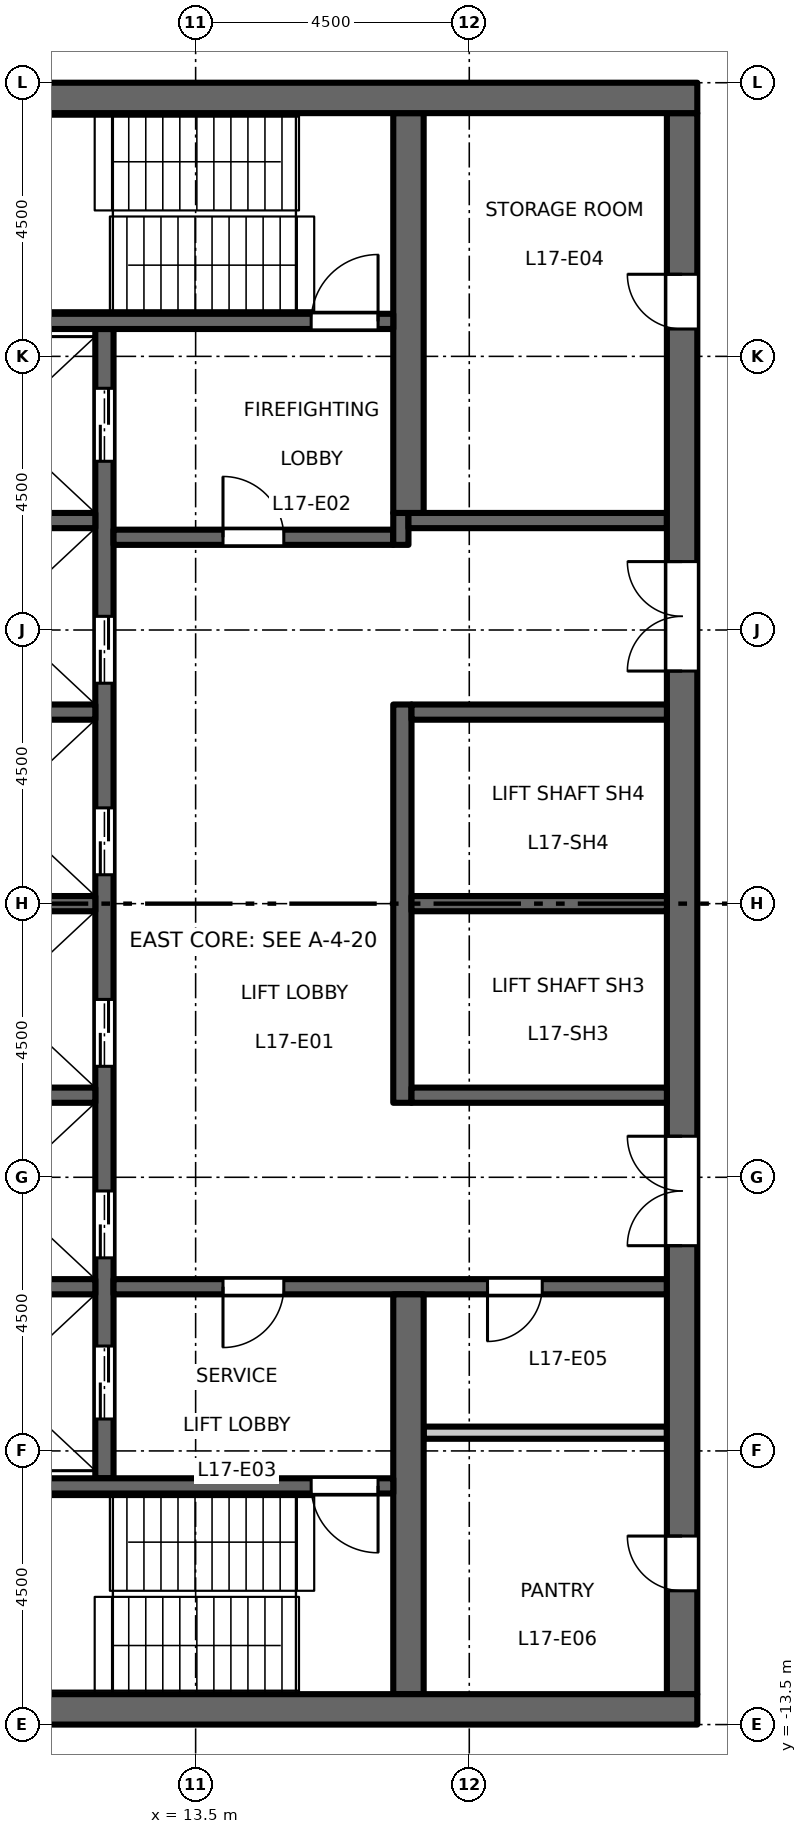
"""IFC4 building model, lengths in metres.
Left out: names, types, materials, properties, quantities, classifications, styles, units other than length and angle.
Written with IfcOpenShell. Run it as: python <this file> out.ifc"""

import sys

from ifc_helpers import new_model, si_unit, direction, frame, frame_2d, origin, place, context, subcontext, project, spatial, rectangle, extrude, element, fill, save


model = new_model("IFC4")
c1 = context("Model", 3, precision=1e-05, world=origin(), true_north=direction((0.0, 1.0)))
c2 = subcontext(c1, "Body", "Model", "MODEL_VIEW")
j1 = project(units=[si_unit("LENGTHUNIT", "METRE"), si_unit("PLANEANGLEUNIT", "RADIAN")], contexts=[c1])
p1 = place(None, origin())
s1 = spatial("IfcSite", under=j1, at=p1, CompositionType="ELEMENT")
p2 = place(p1, origin())
s2 = spatial("IfcBuilding", under=s1, at=p2, CompositionType="ELEMENT")
p3 = place(p2, frame((0.0, 0.0, 80.7)))
s3 = spatial("IfcBuildingStorey", under=s2, at=p3, CompositionType="ELEMENT", Elevation=80.7)
p4 = place(p3, frame((12.0, -9.45, 0.0), z_axis=(0.0, 0.0, 1.0), x_axis=(0.0, 1.0, 0.0)))
e1 = element("IfcWall", 1, at=p4, inside=s3, PredefinedType="SHEAR", context=c2, shape_type="SweptSolid", body=[
    extrude(rectangle(XDim=18.9, YDim=0.3, at=frame_2d((9.45, 0.0))), origin(), (0.0, 0.0, 1.0), 4.35),
])
p5 = place(p4, frame((3.625, 0.0, 0.0)))
e2 = element("IfcOpeningElement", 2, at=p5, cuts=e1, PredefinedType="OPENING", context=c2, shape_type="SweptSolid", body=[
    extrude(rectangle(XDim=1.1, YDim=2.1, at=frame_2d((0.55, 1.05))), frame((0.0, 0.16, 0.0), z_axis=(0.0, -1.0, 0.0), x_axis=(1.0, 0.0, 0.0)), (0.0, 0.0, 1.0), 0.32),
])
p6 = place(p4, frame((6.775, 0.0, 0.0)))
e3 = element("IfcOpeningElement", 3, at=p6, cuts=e1, PredefinedType="OPENING", context=c2, shape_type="SweptSolid", body=[
    extrude(rectangle(XDim=1.1, YDim=2.1, at=frame_2d((0.55, 1.05))), frame((0.0, 0.16, 0.0), z_axis=(0.0, -1.0, 0.0), x_axis=(1.0, 0.0, 0.0)), (0.0, 0.0, 1.0), 0.32),
])
p7 = place(p4, frame((9.925, 0.0, 0.0)))
e4 = element("IfcOpeningElement", 4, at=p7, cuts=e1, PredefinedType="OPENING", context=c2, shape_type="SweptSolid", body=[
    extrude(rectangle(XDim=1.1, YDim=2.1, at=frame_2d((0.55, 1.05))), frame((0.0, 0.16, 0.0), z_axis=(0.0, -1.0, 0.0), x_axis=(1.0, 0.0, 0.0)), (0.0, 0.0, 1.0), 0.32),
])
p8 = place(p4, frame((13.075, 0.0, 0.0)))
e5 = element("IfcOpeningElement", 5, at=p8, cuts=e1, PredefinedType="OPENING", context=c2, shape_type="SweptSolid", body=[
    extrude(rectangle(XDim=1.1, YDim=2.1, at=frame_2d((0.55, 1.05))), frame((0.0, 0.16, 0.0), z_axis=(0.0, -1.0, 0.0), x_axis=(1.0, 0.0, 0.0)), (0.0, 0.0, 1.0), 0.32),
])
p9 = place(p4, frame((16.725, 0.0, 0.0)))
e6 = element("IfcOpeningElement", 6, at=p9, cuts=e1, PredefinedType="OPENING", context=c2, shape_type="SweptSolid", body=[
    extrude(rectangle(XDim=1.2, YDim=2.1, at=frame_2d((0.6, 1.05))), frame((0.0, 0.16, 0.0), z_axis=(0.0, -1.0, 0.0), x_axis=(1.0, 0.0, 0.0)), (0.0, 0.0, 1.0), 0.32),
])
p10 = place(p4, frame((0.975, 0.0, 0.0)))
e7 = element("IfcOpeningElement", 7, at=p10, cuts=e1, PredefinedType="OPENING", context=c2, shape_type="SweptSolid", body=[
    extrude(rectangle(XDim=1.2, YDim=2.1, at=frame_2d((0.6, 1.05))), frame((0.0, 0.16, 0.0), z_axis=(0.0, -1.0, 0.0), x_axis=(1.0, 0.0, 0.0)), (0.0, 0.0, 1.0), 0.32),
])
p11 = place(p3, frame((12.15, 6.025, 0.0), z_axis=(0.0, 0.0, 1.0), x_axis=(1.0, 0.0, 0.0)))
e8 = element("IfcWall", 8, at=p11, inside=s3, PredefinedType="SHEAR", context=c2, shape_type="SweptSolid", body=[
    extrude(rectangle(XDim=4.6, YDim=0.25, at=frame_2d((2.3, 0.0))), origin(), (0.0, 0.0, 1.0), 4.35),
])
p12 = place(p11, frame((1.8, 0.0, 0.0)))
e9 = element("IfcOpeningElement", 9, at=p12, cuts=e8, PredefinedType="OPENING", context=c2, shape_type="SweptSolid", body=[
    extrude(rectangle(XDim=1.0, YDim=2.1, at=frame_2d((0.5, 1.05))), frame((0.0, 0.135, 0.0), z_axis=(0.0, -1.0, 0.0), x_axis=(1.0, 0.0, 0.0)), (0.0, 0.0, 1.0), 0.27),
])
p13 = place(p3, frame((16.875, 5.9, 0.0), z_axis=(0.0, 0.0, 1.0), x_axis=(0.0, 1.0, 0.0)))
e10 = element("IfcWall", 10, at=p13, inside=s3, PredefinedType="SHEAR", context=c2, shape_type="SweptSolid", body=[
    extrude(rectangle(XDim=0.525, YDim=0.25, at=frame_2d((0.263, 0.0))), origin(), (0.0, 0.0, 1.0), 4.35),
])
p14 = place(p3, frame((17.0, 6.3, 0.0), z_axis=(0.0, 0.0, 1.0), x_axis=(1.0, 0.0, 0.0)))
e11 = element("IfcWall", 11, at=p14, inside=s3, PredefinedType="SHEAR", context=c2, shape_type="SweptSolid", body=[
    extrude(rectangle(XDim=4.25, YDim=0.25, at=frame_2d((2.125, 0.0))), origin(), (0.0, 0.0, 1.0), 4.35),
])
p15 = place(p3, frame((12.15, -6.3, 0.0), z_axis=(0.0, 0.0, 1.0), x_axis=(1.0, 0.0, 0.0)))
e12 = element("IfcWall", 12, at=p15, inside=s3, PredefinedType="SHEAR", context=c2, shape_type="SweptSolid", body=[
    extrude(rectangle(XDim=9.1, YDim=0.25, at=frame_2d((4.55, 0.0))), origin(), (0.0, 0.0, 1.0), 4.35),
])
p16 = place(p15, frame((1.8, 0.0, 0.0)))
e13 = element("IfcOpeningElement", 13, at=p16, cuts=e12, PredefinedType="OPENING", context=c2, shape_type="SweptSolid", body=[
    extrude(rectangle(XDim=1.0, YDim=2.1, at=frame_2d((0.5, 1.05))), frame((0.0, 0.135, 0.0), z_axis=(0.0, -1.0, 0.0), x_axis=(1.0, 0.0, 0.0)), (0.0, 0.0, 1.0), 0.27),
])
p17 = place(p15, frame((6.15, 0.0, 0.0)))
e14 = element("IfcOpeningElement", 14, at=p17, cuts=e12, PredefinedType="OPENING", context=c2, shape_type="SweptSolid", body=[
    extrude(rectangle(XDim=0.9, YDim=2.1, at=frame_2d((0.45, 1.05))), frame((0.0, 0.135, 0.0), z_axis=(0.0, -1.0, 0.0), x_axis=(1.0, 0.0, 0.0)), (0.0, 0.0, 1.0), 0.27),
])
p18 = place(p3, frame((21.5, -13.0, 0.0), z_axis=(0.0, 0.0, 1.0), x_axis=(0.0, 1.0, 0.0)))
e15 = element("IfcWall", 15, at=p18, inside=s3, PredefinedType="SHEAR", context=c2, shape_type="SweptSolid", body=[
    extrude(rectangle(XDim=26.0, YDim=0.5, at=frame_2d((13.0, 0.0))), origin(), (0.0, 0.0, 1.0), 4.35),
])
p19 = place(p18, frame((16.825, 0.0, 0.0)))
e16 = element("IfcOpeningElement", 16, at=p19, cuts=e15, PredefinedType="OPENING", context=c2, shape_type="SweptSolid", body=[
    extrude(rectangle(XDim=1.8, YDim=2.1, at=frame_2d((0.9, 1.05))), frame((0.0, 0.26, 0.0), z_axis=(0.0, -1.0, 0.0), x_axis=(1.0, 0.0, 0.0)), (0.0, 0.0, 1.0), 0.52),
])
p20 = place(p18, frame((7.375, 0.0, 0.0)))
e17 = element("IfcOpeningElement", 17, at=p20, cuts=e15, PredefinedType="OPENING", context=c2, shape_type="SweptSolid", body=[
    extrude(rectangle(XDim=1.8, YDim=2.1, at=frame_2d((0.9, 1.05))), frame((0.0, 0.26, 0.0), z_axis=(0.0, -1.0, 0.0), x_axis=(1.0, 0.0, 0.0)), (0.0, 0.0, 1.0), 0.52),
])
p21 = place(p18, frame((22.45, 0.0, 0.0)))
e18 = element("IfcOpeningElement", 18, at=p21, cuts=e15, PredefinedType="OPENING", context=c2, shape_type="SweptSolid", body=[
    extrude(rectangle(XDim=0.9, YDim=2.1, at=frame_2d((0.45, 1.05))), frame((0.0, 0.26, 0.0), z_axis=(0.0, -1.0, 0.0), x_axis=(1.0, 0.0, 0.0)), (0.0, 0.0, 1.0), 0.52),
])
p22 = place(p18, frame((1.7, 0.0, 0.0)))
e19 = element("IfcOpeningElement", 19, at=p22, cuts=e15, PredefinedType="OPENING", context=c2, shape_type="SweptSolid", body=[
    extrude(rectangle(XDim=0.9, YDim=2.1, at=frame_2d((0.45, 1.05))), frame((0.0, 0.26, 0.0), z_axis=(0.0, -1.0, 0.0), x_axis=(1.0, 0.0, 0.0)), (0.0, 0.0, 1.0), 0.52),
])
p23 = place(p3, frame((17.25, -8.7, 0.0), z_axis=(0.0, 0.0, 1.0), x_axis=(1.0, 0.0, 0.0)))
e20 = element("IfcWall", 20, at=p23, inside=s3, PredefinedType="PARTITIONING", context=c2, shape_type="SweptSolid", body=[
    extrude(rectangle(XDim=4.0, YDim=0.2, at=frame_2d((2.0, 0.0))), origin(), (0.0, 0.0, 1.0), 4.35),
])
p24 = place(p3, frame((16.9, -3.275, 0.0), z_axis=(0.0, 0.0, 1.0), x_axis=(0.0, 1.0, 0.0)))
e21 = element("IfcWall", 21, at=p24, inside=s3, PredefinedType="SHEAR", context=c2, shape_type="SweptSolid", body=[
    extrude(rectangle(XDim=6.55, YDim=0.3, at=frame_2d((3.275, 0.0))), origin(), (0.0, 0.0, 1.0), 4.35),
])
for number, where, z_axis, x_axis in (
    (22, (17.05, 0.0, 0.0), (0.0, 0.0, 1.0), (1.0, 0.0, 0.0)),
    (23, (17.05, 3.15, 0.0), (0.0, 0.0, 1.0), (1.0, 0.0, 0.0)),
    (24, (17.05, -3.15, 0.0), (0.0, 0.0, 1.0), (1.0, 0.0, 0.0)),
):
    element("IfcWall", number, at=place(p3, frame(where, z_axis=z_axis, x_axis=x_axis)), inside=s3, PredefinedType="SHEAR", context=c2, shape_type="SweptSolid", body=[
        extrude(rectangle(XDim=4.2, YDim=0.25, at=frame_2d((2.1, 0.0))), origin(), (0.0, 0.0, 1.0), 4.35),
    ])
for number, where, z_axis, x_axis in (
    (25, (17.0, 6.425, 0.0), (0.0, 0.0, 1.0), (0.0, 1.0, 0.0)),
    (26, (17.0, -13.0, 0.0), (0.0, 0.0, 1.0), (0.0, 1.0, 0.0)),
):
    element("IfcWall", number, at=place(p3, frame(where, z_axis=z_axis, x_axis=x_axis)), inside=s3, PredefinedType="SHEAR", context=c2, shape_type="SweptSolid", body=[
        extrude(rectangle(XDim=6.575, YDim=0.5, at=frame_2d((3.288, 0.0))), origin(), (0.0, 0.0, 1.0), 4.35),
    ])
for number, where, z_axis, x_axis in (
    (27, (8.75, 0.0, 0.0), (0.0, 0.0, 1.0), (1.0, 0.0, 0.0)),
    (28, (8.75, 3.15, 0.0), (0.0, 0.0, 1.0), (1.0, 0.0, 0.0)),
    (29, (8.75, 6.3, 0.0), (0.0, 0.0, 1.0), (1.0, 0.0, 0.0)),
    (30, (8.75, -3.15, 0.0), (0.0, 0.0, 1.0), (1.0, 0.0, 0.0)),
    (31, (8.75, -6.3, 0.0), (0.0, 0.0, 1.0), (1.0, 0.0, 0.0)),
):
    element("IfcWall", number, at=place(p3, frame(where, z_axis=z_axis, x_axis=x_axis)), inside=s3, PredefinedType="SHEAR", context=c2, shape_type="SweptSolid", body=[
        extrude(rectangle(XDim=3.1, YDim=0.25, at=frame_2d((1.55, 0.0))), origin(), (0.0, 0.0, 1.0), 4.35),
    ])
p25 = place(p3, frame((8.75, 9.575, 0.0), z_axis=(0.0, 0.0, 1.0), x_axis=(1.0, 0.0, 0.0)))
e32 = element("IfcWall", 32, at=p25, inside=s3, PredefinedType="SHEAR", context=c2, shape_type="SweptSolid", body=[
    extrude(rectangle(XDim=8.0, YDim=0.25, at=frame_2d((4.0, 0.0))), origin(), (0.0, 0.0, 1.0), 4.35),
])
p26 = place(p25, frame((6.65, 0.0, 0.0)))
e33 = element("IfcOpeningElement", 33, at=p26, cuts=e32, PredefinedType="OPENING", context=c2, shape_type="SweptSolid", body=[
    extrude(rectangle(XDim=1.1, YDim=2.1, at=frame_2d((0.55, 1.05))), frame((0.0, 0.135, 0.0), z_axis=(0.0, -1.0, 0.0), x_axis=(1.0, 0.0, 0.0)), (0.0, 0.0, 1.0), 0.27),
])
p27 = place(p3, frame((8.75, -9.575, 0.0), z_axis=(0.0, 0.0, 1.0), x_axis=(1.0, 0.0, 0.0)))
e34 = element("IfcWall", 34, at=p27, inside=s3, PredefinedType="SHEAR", context=c2, shape_type="SweptSolid", body=[
    extrude(rectangle(XDim=8.0, YDim=0.25, at=frame_2d((4.0, 0.0))), origin(), (0.0, 0.0, 1.0), 4.35),
])
p28 = place(p27, frame((6.65, 0.0, 0.0)))
e35 = element("IfcOpeningElement", 35, at=p28, cuts=e34, PredefinedType="OPENING", context=c2, shape_type="SweptSolid", body=[
    extrude(rectangle(XDim=1.1, YDim=2.1, at=frame_2d((0.55, 1.05))), frame((0.0, 0.135, 0.0), z_axis=(0.0, -1.0, 0.0), x_axis=(1.0, 0.0, 0.0)), (0.0, 0.0, 1.0), 0.27),
])
for number, where, z_axis, x_axis in (
    (36, (8.25, 13.25, 0.0), (0.0, 0.0, 1.0), (1.0, 0.0, 0.0)),
    (37, (8.25, -13.25, 0.0), (0.0, 0.0, 1.0), (1.0, 0.0, 0.0)),
):
    element("IfcWall", number, at=place(p3, frame(where, z_axis=z_axis, x_axis=x_axis)), inside=s3, PredefinedType="SHEAR", context=c2, shape_type="SweptSolid", body=[
        extrude(rectangle(XDim=13.5, YDim=0.5, at=frame_2d((6.75, 0.0))), origin(), (0.0, 0.0, 1.0), 4.35),
    ])
p29 = place(p12, origin())
e38 = element("IfcDoor", 38, at=p29, inside=s3, OperationType="SINGLE_SWING_RIGHT", PredefinedType="DOOR", context=c2, shape_type="SweptSolid", body=[
    extrude(rectangle(XDim=1.0, YDim=2.1, at=frame_2d((0.5, 1.05))), frame((0.0, 0.025, 0.0), z_axis=(0.0, -1.0, 0.0), x_axis=(1.0, 0.0, 0.0)), (0.0, 0.0, 1.0), 0.05),
])
fill(e9, e38)
p30 = place(p16, origin())
e39 = element("IfcDoor", 39, at=p30, inside=s3, OperationType="SINGLE_SWING_LEFT", PredefinedType="DOOR", context=c2, shape_type="SweptSolid", body=[
    extrude(rectangle(XDim=1.0, YDim=2.1, at=frame_2d((0.5, 1.05))), frame((0.0, 0.025, 0.0), z_axis=(0.0, -1.0, 0.0), x_axis=(1.0, 0.0, 0.0)), (0.0, 0.0, 1.0), 0.05),
])
fill(e13, e39)
p31 = place(p26, origin())
e40 = element("IfcDoor", 40, at=p31, inside=s3, OperationType="SINGLE_SWING_LEFT", PredefinedType="DOOR", context=c2, shape_type="SweptSolid", body=[
    extrude(rectangle(XDim=1.1, YDim=2.1, at=frame_2d((0.55, 1.05))), frame((0.0, 0.025, 0.0), z_axis=(0.0, -1.0, 0.0), x_axis=(1.0, 0.0, 0.0)), (0.0, 0.0, 1.0), 0.05),
])
fill(e33, e40)
p32 = place(p28, origin())
e41 = element("IfcDoor", 41, at=p32, inside=s3, OperationType="SINGLE_SWING_RIGHT", PredefinedType="DOOR", context=c2, shape_type="SweptSolid", body=[
    extrude(rectangle(XDim=1.1, YDim=2.1, at=frame_2d((0.55, 1.05))), frame((0.0, 0.025, 0.0), z_axis=(0.0, -1.0, 0.0), x_axis=(1.0, 0.0, 0.0)), (0.0, 0.0, 1.0), 0.05),
])
fill(e35, e41)
p33 = place(p19, origin())
e42 = element("IfcDoor", 42, at=p33, inside=s3, OperationType="DOUBLE_DOOR_DOUBLE_SWING", PredefinedType="DOOR", context=c2, shape_type="SweptSolid", body=[
    extrude(rectangle(XDim=1.8, YDim=2.1, at=frame_2d((0.9, 1.05))), frame((0.0, 0.025, 0.0), z_axis=(0.0, -1.0, 0.0), x_axis=(1.0, 0.0, 0.0)), (0.0, 0.0, 1.0), 0.05),
])
fill(e16, e42)
p34 = place(p20, origin())
e43 = element("IfcDoor", 43, at=p34, inside=s3, OperationType="DOUBLE_DOOR_DOUBLE_SWING", PredefinedType="DOOR", context=c2, shape_type="SweptSolid", body=[
    extrude(rectangle(XDim=1.8, YDim=2.1, at=frame_2d((0.9, 1.05))), frame((0.0, 0.025, 0.0), z_axis=(0.0, -1.0, 0.0), x_axis=(1.0, 0.0, 0.0)), (0.0, 0.0, 1.0), 0.05),
])
fill(e17, e43)
p35 = place(p5, origin())
e44 = element("IfcDoor", 44, at=p35, inside=s3, OperationType="DOUBLE_DOOR_SLIDING", PredefinedType="DOOR", context=c2, shape_type="SweptSolid", body=[
    extrude(rectangle(XDim=1.1, YDim=2.1, at=frame_2d((0.55, 1.05))), frame((0.0, 0.025, 0.0), z_axis=(0.0, -1.0, 0.0), x_axis=(1.0, 0.0, 0.0)), (0.0, 0.0, 1.0), 0.05),
])
fill(e2, e44)
p36 = place(p6, origin())
e45 = element("IfcDoor", 45, at=p36, inside=s3, OperationType="DOUBLE_DOOR_SLIDING", PredefinedType="DOOR", context=c2, shape_type="SweptSolid", body=[
    extrude(rectangle(XDim=1.1, YDim=2.1, at=frame_2d((0.55, 1.05))), frame((0.0, 0.025, 0.0), z_axis=(0.0, -1.0, 0.0), x_axis=(1.0, 0.0, 0.0)), (0.0, 0.0, 1.0), 0.05),
])
fill(e3, e45)
p37 = place(p7, origin())
e46 = element("IfcDoor", 46, at=p37, inside=s3, OperationType="DOUBLE_DOOR_SLIDING", PredefinedType="DOOR", context=c2, shape_type="SweptSolid", body=[
    extrude(rectangle(XDim=1.1, YDim=2.1, at=frame_2d((0.55, 1.05))), frame((0.0, 0.025, 0.0), z_axis=(0.0, -1.0, 0.0), x_axis=(1.0, 0.0, 0.0)), (0.0, 0.0, 1.0), 0.05),
])
fill(e4, e46)
p38 = place(p8, origin())
e47 = element("IfcDoor", 47, at=p38, inside=s3, OperationType="DOUBLE_DOOR_SLIDING", PredefinedType="DOOR", context=c2, shape_type="SweptSolid", body=[
    extrude(rectangle(XDim=1.1, YDim=2.1, at=frame_2d((0.55, 1.05))), frame((0.0, 0.025, 0.0), z_axis=(0.0, -1.0, 0.0), x_axis=(1.0, 0.0, 0.0)), (0.0, 0.0, 1.0), 0.05),
])
fill(e5, e47)
p39 = place(p9, origin())
e48 = element("IfcDoor", 48, at=p39, inside=s3, OperationType="DOUBLE_DOOR_SLIDING", PredefinedType="DOOR", context=c2, shape_type="SweptSolid", body=[
    extrude(rectangle(XDim=1.2, YDim=2.1, at=frame_2d((0.6, 1.05))), frame((0.0, 0.025, 0.0), z_axis=(0.0, -1.0, 0.0), x_axis=(1.0, 0.0, 0.0)), (0.0, 0.0, 1.0), 0.05),
])
fill(e6, e48)
p40 = place(p10, origin())
e49 = element("IfcDoor", 49, at=p40, inside=s3, OperationType="DOUBLE_DOOR_SLIDING", PredefinedType="DOOR", context=c2, shape_type="SweptSolid", body=[
    extrude(rectangle(XDim=1.2, YDim=2.1, at=frame_2d((0.6, 1.05))), frame((0.0, 0.025, 0.0), z_axis=(0.0, -1.0, 0.0), x_axis=(1.0, 0.0, 0.0)), (0.0, 0.0, 1.0), 0.05),
])
fill(e7, e49)
p41 = place(p21, origin())
e50 = element("IfcDoor", 50, at=p41, inside=s3, OperationType="SINGLE_SWING_LEFT", PredefinedType="DOOR", context=c2, shape_type="SweptSolid", body=[
    extrude(rectangle(XDim=0.9, YDim=2.1, at=frame_2d((0.45, 1.05))), frame((0.0, 0.025, 0.0), z_axis=(0.0, -1.0, 0.0), x_axis=(1.0, 0.0, 0.0)), (0.0, 0.0, 1.0), 0.05),
])
fill(e18, e50)
p42 = place(p17, origin())
e51 = element("IfcDoor", 51, at=p42, inside=s3, OperationType="SINGLE_SWING_LEFT", PredefinedType="DOOR", context=c2, shape_type="SweptSolid", body=[
    extrude(rectangle(XDim=0.9, YDim=2.1, at=frame_2d((0.45, 1.05))), frame((0.0, 0.025, 0.0), z_axis=(0.0, -1.0, 0.0), x_axis=(1.0, 0.0, 0.0)), (0.0, 0.0, 1.0), 0.05),
])
fill(e14, e51)
p43 = place(p22, origin())
e52 = element("IfcDoor", 52, at=p43, inside=s3, OperationType="SINGLE_SWING_LEFT", PredefinedType="DOOR", context=c2, shape_type="SweptSolid", body=[
    extrude(rectangle(XDim=0.9, YDim=2.1, at=frame_2d((0.45, 1.05))), frame((0.0, 0.025, 0.0), z_axis=(0.0, -1.0, 0.0), x_axis=(1.0, 0.0, 0.0)), (0.0, 0.0, 1.0), 0.05),
])
fill(e19, e52)
save(model, sys.argv[1])
